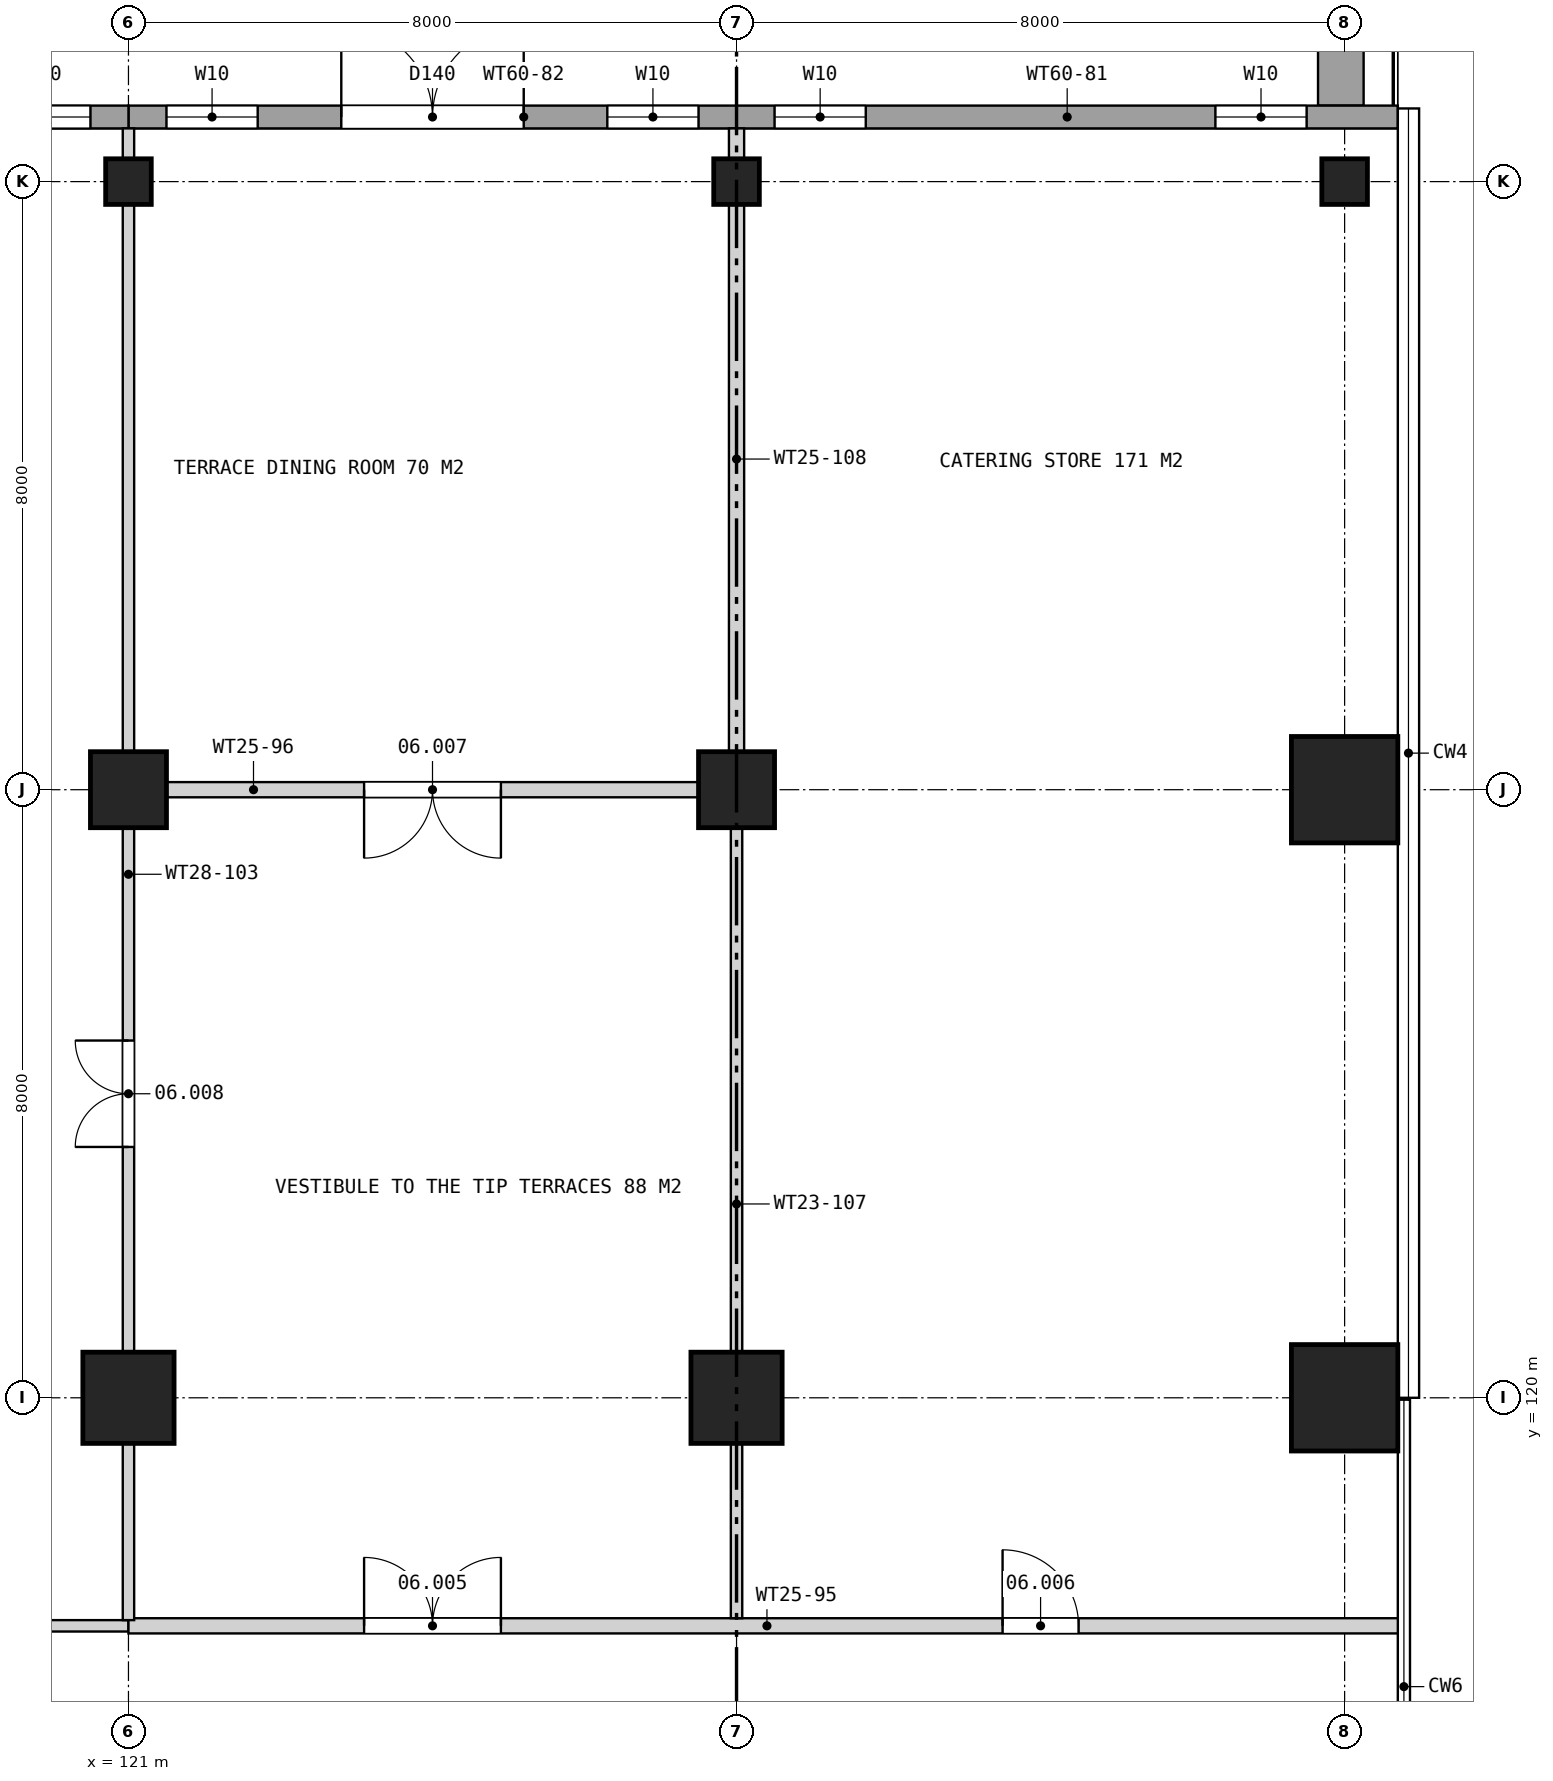
"""IFC4 building model, lengths in metres.
Left out: names, types, materials, properties, quantities, classifications, styles, units other than length and angle.
Written with IfcOpenShell. Run it as: python <this file> out.ifc"""

import sys

from ifc_helpers import new_model, si_unit, direction, frame, frame_2d, origin, origin_2d, place, context, subcontext, project, spatial, rectangle, extrude, element, fill, save


model = new_model("IFC4")
c1 = context("Model", 3, precision=1e-05, world=origin(), true_north=direction((0.0, 1.0)))
c2 = subcontext(c1, "Body", "Model", "MODEL_VIEW")
j1 = project(units=[si_unit("LENGTHUNIT", "METRE"), si_unit("PLANEANGLEUNIT", "RADIAN")], contexts=[c1])
p1 = place(None, origin())
s1 = spatial("IfcSite", under=j1, at=p1, CompositionType="ELEMENT")
p2 = place(p1, origin())
s2 = spatial("IfcBuilding", under=s1, at=p2, CompositionType="ELEMENT")
p3 = place(p2, frame((0.0, 0.0, 47.5)))
s3 = spatial("IfcBuildingStorey", under=s2, at=p3, CompositionType="ELEMENT", Elevation=47.5)
for number, where, z_axis, x_axis in (
    (1, (137.0, 120.0, 0.0), (0.0, 0.0, 1.0), (1.0, 0.0, 0.0)),
    (2, (137.0, 128.0, 0.0), (0.0, 0.0, 1.0), (1.0, 0.0, 0.0)),
):
    element("IfcColumn", number, at=place(p3, frame(where, z_axis=z_axis, x_axis=x_axis)), inside=s3, PredefinedType="COLUMN", context=c2, shape_type="SweptSolid", body=[
        extrude(rectangle(XDim=1.4, YDim=1.4, at=origin_2d()), origin(), (0.0, 0.0, 1.0), 6.0),
    ])
p4 = place(p3, frame((137.0, 136.0, 0.0), z_axis=(0.0, 0.0, 1.0), x_axis=(1.0, 0.0, 0.0)))
e3 = element("IfcColumn", 3, at=p4, inside=s3, PredefinedType="COLUMN", context=c2, shape_type="SweptSolid", body=[
    extrude(rectangle(XDim=0.6, YDim=0.6, at=origin_2d()), origin(), (0.0, 0.0, 1.0), 6.0),
])
p5 = place(p3, frame((121.0, 120.0, 5.2), z_axis=(0.0, 0.0, 1.0), x_axis=(1.0, 0.0, 0.0)))
e4 = element("IfcColumn", 4, at=p5, inside=s3, PredefinedType="COLUMN", context=c2, shape_type="SweptSolid", body=[
    extrude(rectangle(XDim=1.2, YDim=1.2, at=origin_2d()), origin(), (0.0, 0.0, 1.0), 0.8),
])
p6 = place(p3, frame((121.0, 128.0, 5.2), z_axis=(0.0, 0.0, 1.0), x_axis=(1.0, 0.0, 0.0)))
e5 = element("IfcColumn", 5, at=p6, inside=s3, PredefinedType="COLUMN", context=c2, shape_type="SweptSolid", body=[
    extrude(rectangle(XDim=1.0, YDim=1.0, at=origin_2d()), origin(), (0.0, 0.0, 1.0), 0.8),
])
p7 = place(p3, frame((121.0, 136.0, 5.2), z_axis=(0.0, 0.0, 1.0), x_axis=(1.0, 0.0, 0.0)))
e6 = element("IfcColumn", 6, at=p7, inside=s3, PredefinedType="COLUMN", context=c2, shape_type="SweptSolid", body=[
    extrude(rectangle(XDim=0.6, YDim=0.6, at=origin_2d()), origin(), (0.0, 0.0, 1.0), 0.8),
])
p8 = place(p3, frame((129.0, 120.0, 5.2), z_axis=(0.0, 0.0, 1.0), x_axis=(1.0, 0.0, 0.0)))
e7 = element("IfcColumn", 7, at=p8, inside=s3, PredefinedType="COLUMN", context=c2, shape_type="SweptSolid", body=[
    extrude(rectangle(XDim=1.2, YDim=1.2, at=origin_2d()), origin(), (0.0, 0.0, 1.0), 0.8),
])
p9 = place(p3, frame((129.0, 128.0, 5.2), z_axis=(0.0, 0.0, 1.0), x_axis=(1.0, 0.0, 0.0)))
e8 = element("IfcColumn", 8, at=p9, inside=s3, PredefinedType="COLUMN", context=c2, shape_type="SweptSolid", body=[
    extrude(rectangle(XDim=1.0, YDim=1.0, at=origin_2d()), origin(), (0.0, 0.0, 1.0), 0.8),
])
p10 = place(p3, frame((129.0, 136.0, 5.2), z_axis=(0.0, 0.0, 1.0), x_axis=(1.0, 0.0, 0.0)))
e9 = element("IfcColumn", 9, at=p10, inside=s3, PredefinedType="COLUMN", context=c2, shape_type="SweptSolid", body=[
    extrude(rectangle(XDim=0.6, YDim=0.6, at=origin_2d()), origin(), (0.0, 0.0, 1.0), 0.8),
])
p11 = place(p3, frame((136.95, 143.65, 0.0), z_axis=(0.0, 0.0, 1.0), x_axis=(0.0, -1.0, 0.0)))
e10 = element("IfcWall", 10, at=p11, inside=s3, PredefinedType="SOLIDWALL", context=c2, shape_type="SweptSolid", body=[
    extrude(rectangle(XDim=6.65, YDim=0.6, at=frame_2d((3.325, 0.0))), origin(), (0.0, 0.0, 1.0), 0.6),
])
p12 = place(p3, frame((137.7, 136.85, 0.0), z_axis=(0.0, 0.0, 1.0), x_axis=(-1.0, 0.0, 0.0)))
e11 = element("IfcWall", 11, at=p12, inside=s3, PredefinedType="SOLIDWALL", context=c2, shape_type="SweptSolid", body=[
    extrude(rectangle(XDim=8.7, YDim=0.3, at=frame_2d((4.35, 0.0))), origin(), (0.0, 0.0, 1.0), 5.26),
])
p13 = place(p12, frame((1.2, 0.0, 0.4)))
e12 = element("IfcOpeningElement", 12, at=p13, cuts=e11, PredefinedType="OPENING", context=c2, shape_type="SweptSolid", body=[
    extrude(rectangle(XDim=1.2, YDim=2.2, at=frame_2d((0.6, 1.1))), frame((0.0, 0.16, 0.0), z_axis=(0.0, -1.0, 0.0), x_axis=(1.0, 0.0, 0.0)), (0.0, 0.0, 1.0), 0.32),
])
p14 = place(p12, frame((7.0, 0.0, 0.4)))
e13 = element("IfcOpeningElement", 13, at=p14, cuts=e11, PredefinedType="OPENING", context=c2, shape_type="SweptSolid", body=[
    extrude(rectangle(XDim=1.2, YDim=2.2, at=frame_2d((0.6, 1.1))), frame((0.0, 0.16, 0.0), z_axis=(0.0, -1.0, 0.0), x_axis=(1.0, 0.0, 0.0)), (0.0, 0.0, 1.0), 0.32),
])
p15 = place(p3, frame((129.0, 136.85, 0.0), z_axis=(0.0, 0.0, 1.0), x_axis=(-1.0, 0.0, 0.0)))
e14 = element("IfcWall", 14, at=p15, inside=s3, PredefinedType="SOLIDWALL", context=c2, shape_type="SweptSolid", body=[
    extrude(rectangle(XDim=8.0, YDim=0.3, at=frame_2d((4.0, 0.0))), origin(), (0.0, 0.0, 1.0), 5.26),
])
p16 = place(p15, frame((2.8, 0.0, 0.0)))
e15 = element("IfcOpeningElement", 15, at=p16, cuts=e14, PredefinedType="OPENING", context=c2, shape_type="SweptSolid", body=[
    extrude(rectangle(XDim=2.4, YDim=2.4, at=frame_2d((1.2, 1.2))), frame((0.0, 0.16, 0.0), z_axis=(0.0, -1.0, 0.0), x_axis=(1.0, 0.0, 0.0)), (0.0, 0.0, 1.0), 0.32),
])
p17 = place(p15, frame((0.5, 0.0, 0.4)))
e16 = element("IfcOpeningElement", 16, at=p17, cuts=e14, PredefinedType="OPENING", context=c2, shape_type="SweptSolid", body=[
    extrude(rectangle(XDim=1.2, YDim=2.2, at=frame_2d((0.6, 1.1))), frame((0.0, 0.16, 0.0), z_axis=(0.0, -1.0, 0.0), x_axis=(1.0, 0.0, 0.0)), (0.0, 0.0, 1.0), 0.32),
])
p18 = place(p15, frame((6.3, 0.0, 0.4)))
e17 = element("IfcOpeningElement", 17, at=p18, cuts=e14, PredefinedType="OPENING", context=c2, shape_type="SweptSolid", body=[
    extrude(rectangle(XDim=1.2, YDim=2.2, at=frame_2d((0.6, 1.1))), frame((0.0, 0.16, 0.0), z_axis=(0.0, -1.0, 0.0), x_axis=(1.0, 0.0, 0.0)), (0.0, 0.0, 1.0), 0.32),
])
p19 = place(p3, frame((121.0, 136.85, 0.0), z_axis=(0.0, 0.0, 1.0), x_axis=(-1.0, 0.0, 0.0)))
e18 = element("IfcWall", 18, at=p19, inside=s3, PredefinedType="SOLIDWALL", context=c2, shape_type="SweptSolid", body=[
    extrude(rectangle(XDim=8.98, YDim=0.3, at=frame_2d((4.49, 0.0))), origin(), (0.0, 0.0, 1.0), 5.26),
])
p20 = place(p19, frame((0.5, 0.0, 0.4)))
e19 = element("IfcOpeningElement", 19, at=p20, cuts=e18, PredefinedType="OPENING", context=c2, shape_type="SweptSolid", body=[
    extrude(rectangle(XDim=1.2, YDim=2.2, at=frame_2d((0.6, 1.1))), frame((0.0, 0.16, 0.0), z_axis=(0.0, -1.0, 0.0), x_axis=(1.0, 0.0, 0.0)), (0.0, 0.0, 1.0), 0.32),
])
p21 = place(p19, frame((6.3, 0.0, 0.4)))
e20 = element("IfcOpeningElement", 20, at=p21, cuts=e18, PredefinedType="OPENING", context=c2, shape_type="SweptSolid", body=[
    extrude(rectangle(XDim=1.2, YDim=2.2, at=frame_2d((0.6, 1.1))), frame((0.0, 0.16, 0.0), z_axis=(0.0, -1.0, 0.0), x_axis=(1.0, 0.0, 0.0)), (0.0, 0.0, 1.0), 0.32),
])
p22 = place(p3, frame((112.2, 117.0, 0.0), z_axis=(0.0, 0.0, 1.0), x_axis=(1.0, 0.0, 0.0)))
e21 = element("IfcWall", 21, at=p22, inside=s3, PredefinedType="SOLIDWALL", context=c2, shape_type="SweptSolid", body=[
    extrude(rectangle(XDim=8.8, YDim=0.15, at=frame_2d((4.4, 0.0))), origin(), (0.0, 0.0, 1.0), 5.26),
])
p23 = place(p22, frame((4.1, 0.0, 0.0)))
e22 = element("IfcOpeningElement", 22, at=p23, cuts=e21, PredefinedType="OPENING", context=c2, shape_type="SweptSolid", body=[
    extrude(rectangle(XDim=1.4, YDim=2.2, at=frame_2d((0.7, 1.1))), frame((0.0, 0.085, 0.0), z_axis=(0.0, -1.0, 0.0), x_axis=(1.0, 0.0, 0.0)), (0.0, 0.0, 1.0), 0.17),
])
p24 = place(p3, frame((121.0, 117.0, 0.0), z_axis=(0.0, 0.0, 1.0), x_axis=(1.0, 0.0, 0.0)))
e23 = element("IfcWall", 23, at=p24, inside=s3, PredefinedType="PARTITIONING", context=c2, shape_type="SweptSolid", body=[
    extrude(rectangle(XDim=16.8, YDim=0.2, at=frame_2d((8.4, 0.0))), origin(), (0.0, 0.0, 1.0), 5.26),
])
p25 = place(p24, frame((3.1, 0.0, 0.0)))
e24 = element("IfcOpeningElement", 24, at=p25, cuts=e23, PredefinedType="OPENING", context=c2, shape_type="SweptSolid", body=[
    extrude(rectangle(XDim=1.8, YDim=2.4, at=frame_2d((0.9, 1.2))), frame((0.0, 0.11, 0.0), z_axis=(0.0, -1.0, 0.0), x_axis=(1.0, 0.0, 0.0)), (0.0, 0.0, 1.0), 0.22),
])
p26 = place(p24, frame((11.5, 0.0, 0.0)))
e25 = element("IfcOpeningElement", 25, at=p26, cuts=e23, PredefinedType="OPENING", context=c2, shape_type="SweptSolid", body=[
    extrude(rectangle(XDim=1.0, YDim=2.1, at=frame_2d((0.5, 1.05))), frame((0.0, 0.11, 0.0), z_axis=(0.0, -1.0, 0.0), x_axis=(1.0, 0.0, 0.0)), (0.0, 0.0, 1.0), 0.22),
])
p27 = place(p3, frame((121.075, 128.0, 0.0), z_axis=(0.0, 0.0, 1.0), x_axis=(1.0, 0.0, 0.0)))
e26 = element("IfcWall", 26, at=p27, inside=s3, PredefinedType="PARTITIONING", context=c2, shape_type="SweptSolid", body=[
    extrude(rectangle(XDim=7.85, YDim=0.2, at=frame_2d((3.925, 0.0))), origin(), (0.0, 0.0, 1.0), 2.7),
])
p28 = place(p27, frame((3.025, 0.0, 0.0)))
e27 = element("IfcOpeningElement", 27, at=p28, cuts=e26, PredefinedType="OPENING", context=c2, shape_type="SweptSolid", body=[
    extrude(rectangle(XDim=1.8, YDim=2.4, at=frame_2d((0.9, 1.2))), frame((0.0, 0.11, 0.0), z_axis=(0.0, -1.0, 0.0), x_axis=(1.0, 0.0, 0.0)), (0.0, 0.0, 1.0), 0.22),
])
p29 = place(p3, frame((121.0, 117.075, 0.0), z_axis=(0.0, 0.0, 1.0), x_axis=(0.0, 1.0, 0.0)))
e28 = element("IfcWall", 28, at=p29, inside=s3, PredefinedType="SOLIDWALL", context=c2, shape_type="SweptSolid", body=[
    extrude(rectangle(XDim=19.625, YDim=0.15, at=frame_2d((9.812, 0.0))), origin(), (0.0, 0.0, 1.0), 2.7),
])
p30 = place(p29, frame((6.225, 0.0, 0.0)))
e29 = element("IfcOpeningElement", 29, at=p30, cuts=e28, PredefinedType="OPENING", context=c2, shape_type="SweptSolid", body=[
    extrude(rectangle(XDim=1.4, YDim=2.2, at=frame_2d((0.7, 1.1))), frame((0.0, 0.085, 0.0), z_axis=(0.0, -1.0, 0.0), x_axis=(1.0, 0.0, 0.0)), (0.0, 0.0, 1.0), 0.17),
])
p31 = place(p3, frame((129.0, 117.1, 0.0), z_axis=(0.0, 0.0, 1.0), x_axis=(0.0, 1.0, 0.0)))
e30 = element("IfcWall", 30, at=p31, inside=s3, PredefinedType="PARTITIONING", context=c2, shape_type="SweptSolid", body=[
    extrude(rectangle(XDim=10.9, YDim=0.15, at=frame_2d((5.45, 0.0))), origin(), (0.0, 0.0, 1.0), 2.7),
])
p32 = place(p3, frame((129.0, 128.0, 0.0), z_axis=(0.0, 0.0, 1.0), x_axis=(0.0, 1.0, 0.0)))
e31 = element("IfcWall", 31, at=p32, inside=s3, PredefinedType="PARTITIONING", context=c2, shape_type="SweptSolid", body=[
    extrude(rectangle(XDim=8.7, YDim=0.2, at=frame_2d((4.35, 0.0))), origin(), (0.0, 0.0, 1.0), 2.7),
])
p33 = place(p13, origin())
e32 = element("IfcWindow", 32, at=p33, inside=s3, PartitioningType="SINGLE_PANEL", PredefinedType="WINDOW", context=c2, shape_type="SweptSolid", body=[
    extrude(rectangle(XDim=1.2, YDim=2.2, at=frame_2d((0.6, 1.1))), frame((0.0, 0.03, 0.0), z_axis=(0.0, -1.0, 0.0), x_axis=(1.0, 0.0, 0.0)), (0.0, 0.0, 1.0), 0.06),
])
fill(e12, e32)
p34 = place(p14, origin())
e33 = element("IfcWindow", 33, at=p34, inside=s3, PartitioningType="SINGLE_PANEL", PredefinedType="WINDOW", context=c2, shape_type="SweptSolid", body=[
    extrude(rectangle(XDim=1.2, YDim=2.2, at=frame_2d((0.6, 1.1))), frame((0.0, 0.03, 0.0), z_axis=(0.0, -1.0, 0.0), x_axis=(1.0, 0.0, 0.0)), (0.0, 0.0, 1.0), 0.06),
])
fill(e13, e33)
p35 = place(p16, frame((2.4, 0.0, 0.0), z_axis=(0.0, 0.0, 1.0), x_axis=(-1.0, 0.0, 0.0)))
e34 = element("IfcDoor", 34, at=p35, inside=s3, OperationType="DOUBLE_DOOR_SINGLE_SWING", PredefinedType="DOOR", context=c2, shape_type="SweptSolid", body=[
    extrude(rectangle(XDim=2.4, YDim=2.4, at=frame_2d((1.2, 1.2))), frame((0.0, 0.025, 0.0), z_axis=(0.0, -1.0, 0.0), x_axis=(1.0, 0.0, 0.0)), (0.0, 0.0, 1.0), 0.05),
])
fill(e15, e34)
p36 = place(p17, origin())
e35 = element("IfcWindow", 35, at=p36, inside=s3, PartitioningType="SINGLE_PANEL", PredefinedType="WINDOW", context=c2, shape_type="SweptSolid", body=[
    extrude(rectangle(XDim=1.2, YDim=2.2, at=frame_2d((0.6, 1.1))), frame((0.0, 0.03, 0.0), z_axis=(0.0, -1.0, 0.0), x_axis=(1.0, 0.0, 0.0)), (0.0, 0.0, 1.0), 0.06),
])
fill(e16, e35)
p37 = place(p18, origin())
e36 = element("IfcWindow", 36, at=p37, inside=s3, PartitioningType="SINGLE_PANEL", PredefinedType="WINDOW", context=c2, shape_type="SweptSolid", body=[
    extrude(rectangle(XDim=1.2, YDim=2.2, at=frame_2d((0.6, 1.1))), frame((0.0, 0.03, 0.0), z_axis=(0.0, -1.0, 0.0), x_axis=(1.0, 0.0, 0.0)), (0.0, 0.0, 1.0), 0.06),
])
fill(e17, e36)
p38 = place(p20, origin())
e37 = element("IfcWindow", 37, at=p38, inside=s3, PartitioningType="SINGLE_PANEL", PredefinedType="WINDOW", context=c2, shape_type="SweptSolid", body=[
    extrude(rectangle(XDim=1.2, YDim=2.2, at=frame_2d((0.6, 1.1))), frame((0.0, 0.03, 0.0), z_axis=(0.0, -1.0, 0.0), x_axis=(1.0, 0.0, 0.0)), (0.0, 0.0, 1.0), 0.06),
])
fill(e19, e37)
p39 = place(p25, origin())
e38 = element("IfcDoor", 38, at=p39, inside=s3, OperationType="DOUBLE_DOOR_SINGLE_SWING", PredefinedType="DOOR", context=c2, shape_type="SweptSolid", body=[
    extrude(rectangle(XDim=1.8, YDim=2.4, at=frame_2d((0.9, 1.2))), frame((0.0, 0.025, 0.0), z_axis=(0.0, -1.0, 0.0), x_axis=(1.0, 0.0, 0.0)), (0.0, 0.0, 1.0), 0.05),
])
fill(e24, e38)
p40 = place(p26, origin())
e39 = element("IfcDoor", 39, at=p40, inside=s3, OperationType="SINGLE_SWING_LEFT", PredefinedType="DOOR", context=c2, shape_type="SweptSolid", body=[
    extrude(rectangle(XDim=1.0, YDim=2.1, at=frame_2d((0.5, 1.05))), frame((0.0, 0.025, 0.0), z_axis=(0.0, -1.0, 0.0), x_axis=(1.0, 0.0, 0.0)), (0.0, 0.0, 1.0), 0.05),
])
fill(e25, e39)
p41 = place(p28, frame((1.8, 0.0, 0.0), z_axis=(0.0, 0.0, 1.0), x_axis=(-1.0, 0.0, 0.0)))
e40 = element("IfcDoor", 40, at=p41, inside=s3, OperationType="DOUBLE_DOOR_SINGLE_SWING", PredefinedType="DOOR", context=c2, shape_type="SweptSolid", body=[
    extrude(rectangle(XDim=1.8, YDim=2.4, at=frame_2d((0.9, 1.2))), frame((0.0, 0.025, 0.0), z_axis=(0.0, -1.0, 0.0), x_axis=(1.0, 0.0, 0.0)), (0.0, 0.0, 1.0), 0.05),
])
fill(e27, e40)
p42 = place(p30, origin())
e41 = element("IfcDoor", 41, at=p42, inside=s3, OperationType="DOUBLE_DOOR_SINGLE_SWING", PredefinedType="DOOR", context=c2, shape_type="SweptSolid", body=[
    extrude(rectangle(XDim=1.4, YDim=2.2, at=frame_2d((0.7, 1.1))), frame((0.0, 0.025, 0.0), z_axis=(0.0, -1.0, 0.0), x_axis=(1.0, 0.0, 0.0)), (0.0, 0.0, 1.0), 0.05),
])
fill(e29, e41)
save(model, sys.argv[1])
